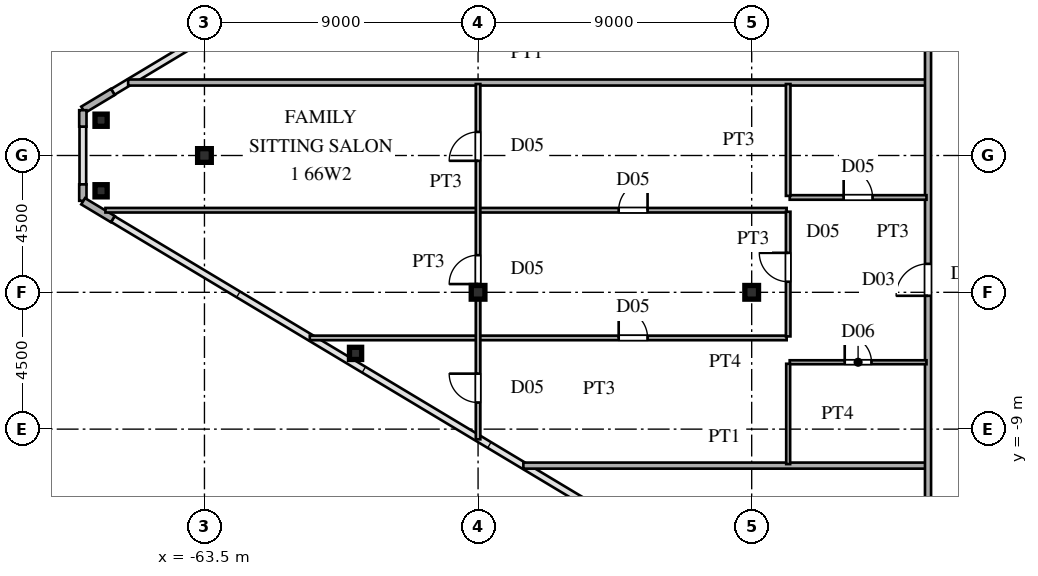
"""IFC4 building model, lengths in metres.
Left out: names, types, materials, properties, quantities, classifications, styles, units other than length and angle.
Written with IfcOpenShell. Run it as: python <this file> out.ifc"""

import sys

from ifc_helpers import new_model, si_unit, direction, frame, frame_2d, origin, origin_2d, place, context, subcontext, project, spatial, rectangle, hollow_rectangle, i_section, extrude, source, transform, mapped, element, fill, save


model = new_model("IFC4")
c1 = context("Model", 3, precision=1e-05, world=origin(), true_north=direction((0.0, 1.0)))
c2 = subcontext(c1, "Body", "Model", "MODEL_VIEW")
j1 = project(units=[si_unit("LENGTHUNIT", "METRE"), si_unit("PLANEANGLEUNIT", "RADIAN")], contexts=[c1])
p1 = place(None, origin())
s1 = spatial("IfcSite", under=j1, at=p1, CompositionType="ELEMENT")
p2 = place(p1, origin())
s2 = spatial("IfcBuilding", under=s1, at=p2, CompositionType="ELEMENT")
p3 = place(p2, frame((0.0, 0.0, 250.65)))
s3 = spatial("IfcBuildingStorey", under=s2, at=p3, CompositionType="ELEMENT", Elevation=250.65)
m1 = source(origin(), c2, "Body", "SweptSolid", [
    extrude(i_section(OverallWidth=0.45, OverallDepth=0.45, WebThickness=0.016, FlangeThickness=0.025, at=origin_2d()), origin(), (0.0, 0.0, 1.0), 3.75),
])
for number, where, z_axis, x_axis in (
    (1, (-45.5, -4.5, 0.0), (0.0, 0.0, 1.0), (1.0, 0.0, 0.0)),
    (2, (-54.5, -4.5, 0.0), (0.0, 0.0, 1.0), (1.0, 0.0, 0.0)),
    (3, (-63.5, 0.0, 0.0), (0.0, 0.0, 1.0), (1.0, 0.0, 0.0)),
):
    element("IfcColumn", number, at=place(p3, frame(where, z_axis=z_axis, x_axis=x_axis)), inside=s3, PredefinedType="COLUMN", context=c2, shape_type="MappedRepresentation", body=[
        mapped(m1, transform((0.0, 0.0, 0.0), scale=1.0)),
    ])
m2 = source(origin(), c2, "Body", "SweptSolid", [
    extrude(hollow_rectangle(XDim=0.4, YDim=0.4, WallThickness=0.016, at=origin_2d()), origin(), (0.0, 0.0, 1.0), 3.75),
])
for number, where, z_axis, x_axis in (
    (4, (-66.9, 1.16, 0.0), (0.0, 0.0, 1.0), (1.0, 0.0, 0.0)),
    (5, (-66.9, -1.16, 0.0), (0.0, 0.0, 1.0), (1.0, 0.0, 0.0)),
    (6, (-58.53, -6.509, 0.0), (0.0, 0.0, 1.0), (1.0, 0.0, 0.0)),
):
    element("IfcColumn", number, at=place(p3, frame(where, z_axis=z_axis, x_axis=x_axis)), inside=s3, PredefinedType="COLUMN", context=c2, shape_type="MappedRepresentation", body=[
        mapped(m2, transform((0.0, 0.0, 0.0), scale=1.0)),
    ])
p4 = place(p3, frame((-66.514, 2.092, 0.0), z_axis=(0.0, 0.0, 1.0), x_axis=(-0.85743623509, -0.514590228002, 0.0)))
e7 = element("IfcWall", 7, at=p4, inside=s3, PredefinedType="SOLIDWALL", context=c2, shape_type="SweptSolid", body=[
    extrude(rectangle(XDim=1.14, YDim=0.24, at=frame_2d((0.57, 0.0))), origin(), (0.0, 0.0, 1.0), 3.53),
])
for number, where, z_axis, x_axis in (
    (8, (-67.5, 1.49, 0.0), (0.0, 0.0, 1.0), (0.0, -1.0, 0.0)),
    (9, (-67.5, -0.95, 0.0), (0.0, 0.0, 1.0), (0.0, -1.0, 0.0)),
):
    element("IfcWall", number, at=place(p3, frame(where, z_axis=z_axis, x_axis=x_axis)), inside=s3, PredefinedType="SOLIDWALL", context=c2, shape_type="SweptSolid", body=[
        extrude(rectangle(XDim=0.54, YDim=0.24, at=frame_2d((0.27, 0.0))), origin(), (0.0, 0.0, 1.0), 3.53),
    ])
p5 = place(p3, frame((-67.491, -1.505, 0.0), z_axis=(0.0, 0.0, 1.0), x_axis=(0.85743623509, -0.514590228002, 0.0)))
e10 = element("IfcWall", 10, at=p5, inside=s3, PredefinedType="SOLIDWALL", context=c2, shape_type="SweptSolid", body=[
    extrude(rectangle(XDim=1.14, YDim=0.24, at=frame_2d((0.57, 0.0))), origin(), (0.0, 0.0, 1.0), 3.53),
])
p6 = place(p3, frame((-53.01, -10.2, 0.0), z_axis=(0.0, 0.0, 1.0), x_axis=(1.0, 0.0, 0.0)))
e11 = element("IfcWall", 11, at=p6, inside=s3, PredefinedType="PARTITIONING", context=c2, shape_type="SweptSolid", body=[
    extrude(rectangle(XDim=13.23, YDim=0.2, at=frame_2d((6.615, 0.0))), origin(), (0.0, 0.0, 1.0), 3.53),
])
p7 = place(p3, frame((-44.25, -6.8, 0.0), z_axis=(0.0, 0.0, 1.0), x_axis=(1.0, 0.0, 0.0)))
e12 = element("IfcWall", 12, at=p7, inside=s3, PredefinedType="PARTITIONING", context=c2, shape_type="SweptSolid", body=[
    extrude(rectangle(XDim=4.5, YDim=0.13, at=frame_2d((2.25, 0.0))), origin(), (0.0, 0.0, 1.0), 3.53),
])
p8 = place(p7, frame((1.81, 0.0, 0.0)))
e13 = element("IfcOpeningElement", 13, at=p8, cuts=e12, PredefinedType="OPENING", context=c2, shape_type="SweptSolid", body=[
    extrude(rectangle(XDim=0.88, YDim=2.1, at=frame_2d((0.44, 1.05))), frame((0.0, 0.075, 0.0), z_axis=(0.0, -1.0, 0.0), x_axis=(1.0, 0.0, 0.0)), (0.0, 0.0, 1.0), 0.15),
])
p9 = place(p3, frame((-60.035, -6.0, 0.0), z_axis=(0.0, 0.0, 1.0), x_axis=(1.0, 0.0, 0.0)))
e14 = element("IfcWall", 14, at=p9, inside=s3, PredefinedType="PARTITIONING", context=c2, shape_type="SweptSolid", body=[
    extrude(rectangle(XDim=15.685, YDim=0.15, at=frame_2d((7.842, 0.0))), origin(), (0.0, 0.0, 1.0), 3.53),
])
p10 = place(p9, frame((10.16, 0.0, 0.0)))
e15 = element("IfcOpeningElement", 15, at=p10, cuts=e14, PredefinedType="OPENING", context=c2, shape_type="SweptSolid", body=[
    extrude(rectangle(XDim=0.95, YDim=2.15, at=frame_2d((0.475, 1.075))), frame((0.0, 0.085, 0.0), z_axis=(0.0, -1.0, 0.0), x_axis=(1.0, 0.0, 0.0)), (0.0, 0.0, 1.0), 0.17),
])
p11 = place(p3, frame((-66.757, -1.8, 0.0), z_axis=(0.0, 0.0, 1.0), x_axis=(1.0, 0.0, 0.0)))
e16 = element("IfcWall", 16, at=p11, inside=s3, PredefinedType="PARTITIONING", context=c2, shape_type="SweptSolid", body=[
    extrude(rectangle(XDim=22.407, YDim=0.15, at=frame_2d((11.204, 0.0))), origin(), (0.0, 0.0, 1.0), 3.53),
])
p12 = place(p11, frame((16.882, 0.0, 0.0)))
e17 = element("IfcOpeningElement", 17, at=p12, cuts=e16, PredefinedType="OPENING", context=c2, shape_type="SweptSolid", body=[
    extrude(rectangle(XDim=0.95, YDim=2.15, at=frame_2d((0.475, 1.075))), frame((0.0, 0.085, 0.0), z_axis=(0.0, -1.0, 0.0), x_axis=(1.0, 0.0, 0.0)), (0.0, 0.0, 1.0), 0.17),
])
p13 = place(p3, frame((-44.25, -1.38, 0.0), z_axis=(0.0, 0.0, 1.0), x_axis=(1.0, 0.0, 0.0)))
e18 = element("IfcWall", 18, at=p13, inside=s3, PredefinedType="PARTITIONING", context=c2, shape_type="SweptSolid", body=[
    extrude(rectangle(XDim=4.5, YDim=0.15, at=frame_2d((2.25, 0.0))), origin(), (0.0, 0.0, 1.0), 3.53),
])
p14 = place(p13, frame((1.775, 0.0, 0.0)))
e19 = element("IfcOpeningElement", 19, at=p14, cuts=e18, PredefinedType="OPENING", context=c2, shape_type="SweptSolid", body=[
    extrude(rectangle(XDim=0.95, YDim=2.15, at=frame_2d((0.475, 1.075))), frame((0.0, 0.085, 0.0), z_axis=(0.0, -1.0, 0.0), x_axis=(1.0, 0.0, 0.0)), (0.0, 0.0, 1.0), 0.17),
])
p15 = place(p3, frame((-66.01, 2.4, 0.0), z_axis=(0.0, 0.0, 1.0), x_axis=(1.0, 0.0, 0.0)))
e20 = element("IfcWall", 20, at=p15, inside=s3, PredefinedType="PARTITIONING", context=c2, shape_type="SweptSolid", body=[
    extrude(rectangle(XDim=26.23, YDim=0.2, at=frame_2d((13.115, 0.0))), origin(), (0.0, 0.0, 1.0), 3.53),
])
p16 = place(p3, frame((-54.5, -9.335, 0.0), z_axis=(0.0, 0.0, 1.0), x_axis=(0.0, 1.0, 0.0)))
e21 = element("IfcWall", 21, at=p16, inside=s3, PredefinedType="PARTITIONING", context=c2, shape_type="SweptSolid", body=[
    extrude(rectangle(XDim=11.685, YDim=0.15, at=frame_2d((5.843, 0.0))), origin(), (0.0, 0.0, 1.0), 2.93),
])
p17 = place(p16, frame((5.107, 0.0, 0.0)))
e22 = element("IfcOpeningElement", 22, at=p17, cuts=e21, PredefinedType="OPENING", context=c2, shape_type="SweptSolid", body=[
    extrude(rectangle(XDim=0.95, YDim=2.15, at=frame_2d((0.475, 1.075))), frame((0.0, 0.085, 0.0), z_axis=(0.0, -1.0, 0.0), x_axis=(1.0, 0.0, 0.0)), (0.0, 0.0, 1.0), 0.17),
])
p18 = place(p16, frame((1.21, 0.0, 0.0)))
e23 = element("IfcOpeningElement", 23, at=p18, cuts=e21, PredefinedType="OPENING", context=c2, shape_type="SweptSolid", body=[
    extrude(rectangle(XDim=0.95, YDim=2.15, at=frame_2d((0.475, 1.075))), frame((0.0, 0.085, 0.0), z_axis=(0.0, -1.0, 0.0), x_axis=(1.0, 0.0, 0.0)), (0.0, 0.0, 1.0), 0.17),
])
p19 = place(p16, frame((9.16, 0.0, 0.0)))
e24 = element("IfcOpeningElement", 24, at=p19, cuts=e21, PredefinedType="OPENING", context=c2, shape_type="SweptSolid", body=[
    extrude(rectangle(XDim=0.95, YDim=2.15, at=frame_2d((0.475, 1.075))), frame((0.0, 0.085, 0.0), z_axis=(0.0, -1.0, 0.0), x_axis=(1.0, 0.0, 0.0)), (0.0, 0.0, 1.0), 0.17),
])
p20 = place(p3, frame((-44.3, -10.15, 0.0), z_axis=(0.0, 0.0, 1.0), x_axis=(0.0, 1.0, 0.0)))
e25 = element("IfcWall", 25, at=p20, inside=s3, PredefinedType="PARTITIONING", context=c2, shape_type="SweptSolid", body=[
    extrude(rectangle(XDim=3.3, YDim=0.13, at=frame_2d((1.65, 0.0))), origin(), (0.0, 0.0, 1.0), 3.53),
])
p21 = place(p3, frame((-44.3, -5.95, 0.0), z_axis=(0.0, 0.0, 1.0), x_axis=(0.0, 1.0, 0.0)))
e26 = element("IfcWall", 26, at=p21, inside=s3, PredefinedType="PARTITIONING", context=c2, shape_type="SweptSolid", body=[
    extrude(rectangle(XDim=4.1, YDim=0.15, at=frame_2d((2.05, 0.0))), origin(), (0.0, 0.0, 1.0), 3.53),
])
p22 = place(p21, frame((1.798, 0.0, 0.0)))
e27 = element("IfcOpeningElement", 27, at=p22, cuts=e26, PredefinedType="OPENING", context=c2, shape_type="SweptSolid", body=[
    extrude(rectangle(XDim=0.95, YDim=2.15, at=frame_2d((0.475, 1.075))), frame((0.0, 0.085, 0.0), z_axis=(0.0, -1.0, 0.0), x_axis=(1.0, 0.0, 0.0)), (0.0, 0.0, 1.0), 0.17),
])
p23 = place(p3, frame((-44.3, -1.328, 0.0), z_axis=(0.0, 0.0, 1.0), x_axis=(0.0, 1.0, 0.0)))
e28 = element("IfcWall", 28, at=p23, inside=s3, PredefinedType="PARTITIONING", context=c2, shape_type="SweptSolid", body=[
    extrude(rectangle(XDim=3.678, YDim=0.15, at=frame_2d((1.839, 0.0))), origin(), (0.0, 0.0, 1.0), 3.53),
])
p24 = place(p3, frame((-39.7, -15.515, 0.0), z_axis=(0.0, 0.0, 1.0), x_axis=(0.0, 1.0, 0.0)))
e29 = element("IfcWall", 29, at=p24, inside=s3, PredefinedType="PARTITIONING", context=c2, shape_type="SweptSolid", body=[
    extrude(rectangle(XDim=31.03, YDim=0.2, at=frame_2d((15.515, 0.0))), origin(), (0.0, 0.0, 1.0), 3.53),
])
p25 = place(p24, frame((2.09, 0.0, 0.0)))
e30 = element("IfcOpeningElement", 30, at=p25, cuts=e29, PredefinedType="OPENING", context=c2, shape_type="SweptSolid", body=[
    extrude(rectangle(XDim=1.05, YDim=2.25, at=frame_2d((0.525, 1.125))), frame((0.0, 0.11, 0.0), z_axis=(0.0, -1.0, 0.0), x_axis=(1.0, 0.0, 0.0)), (0.0, 0.0, 1.0), 0.22),
])
p26 = place(p24, frame((10.901, 0.0, 0.0)))
e31 = element("IfcOpeningElement", 31, at=p26, cuts=e29, PredefinedType="OPENING", context=c2, shape_type="SweptSolid", body=[
    extrude(rectangle(XDim=1.05, YDim=2.25, at=frame_2d((0.525, 1.125))), frame((0.0, 0.11, 0.0), z_axis=(0.0, -1.0, 0.0), x_axis=(1.0, 0.0, 0.0)), (0.0, 0.0, 1.0), 0.22),
])
p27 = place(p24, frame((23.99, 0.0, 0.0)))
e32 = element("IfcOpeningElement", 32, at=p27, cuts=e29, PredefinedType="OPENING", context=c2, shape_type="SweptSolid", body=[
    extrude(rectangle(XDim=1.05, YDim=2.25, at=frame_2d((0.525, 1.125))), frame((0.0, 0.11, 0.0), z_axis=(0.0, -1.0, 0.0), x_axis=(1.0, 0.0, 0.0)), (0.0, 0.0, 1.0), 0.22),
])
m3 = source(origin(), c2, "Body", "SweptSolid", [
    extrude(rectangle(XDim=0.88, YDim=2.1, at=frame_2d((0.44, 1.05))), frame((0.0, 0.025, 0.0), z_axis=(0.0, -1.0, 0.0), x_axis=(1.0, 0.0, 0.0)), (0.0, 0.0, 1.0), 0.05),
])
p28 = place(p8, origin())
e33 = element("IfcDoor", 33, at=p28, inside=s3, OperationType="SINGLE_SWING_LEFT", PredefinedType="DOOR", context=c2, shape_type="MappedRepresentation", body=[
    mapped(m3, transform((0.0, 0.0, 0.0), scale=1.0)),
])
fill(e13, e33)
m4 = source(origin(), c2, "Body", "SweptSolid", [
    extrude(rectangle(XDim=0.95, YDim=2.15, at=frame_2d((0.475, 1.075))), frame((0.0, 0.025, 0.0), z_axis=(0.0, -1.0, 0.0), x_axis=(1.0, 0.0, 0.0)), (0.0, 0.0, 1.0), 0.05),
])
p29 = place(p10, origin())
e34 = element("IfcDoor", 34, at=p29, inside=s3, OperationType="SINGLE_SWING_LEFT", PredefinedType="DOOR", context=c2, shape_type="MappedRepresentation", body=[
    mapped(m4, transform((0.0, 0.0, 0.0), scale=1.0)),
])
fill(e15, e34)
p30 = place(p12, origin())
e35 = element("IfcDoor", 35, at=p30, inside=s3, OperationType="SINGLE_SWING_RIGHT", PredefinedType="DOOR", context=c2, shape_type="MappedRepresentation", body=[
    mapped(m4, transform((0.0, 0.0, 0.0), scale=1.0)),
])
fill(e17, e35)
p31 = place(p14, origin())
e36 = element("IfcDoor", 36, at=p31, inside=s3, OperationType="SINGLE_SWING_LEFT", PredefinedType="DOOR", context=c2, shape_type="MappedRepresentation", body=[
    mapped(m4, transform((0.0, 0.0, 0.0), scale=1.0)),
])
fill(e19, e36)
p32 = place(p17, origin())
e37 = element("IfcDoor", 37, at=p32, inside=s3, OperationType="SINGLE_SWING_LEFT", PredefinedType="DOOR", context=c2, shape_type="MappedRepresentation", body=[
    mapped(m4, transform((0.0, 0.0, 0.0), scale=1.0)),
])
fill(e22, e37)
p33 = place(p18, origin())
e38 = element("IfcDoor", 38, at=p33, inside=s3, OperationType="SINGLE_SWING_RIGHT", PredefinedType="DOOR", context=c2, shape_type="MappedRepresentation", body=[
    mapped(m4, transform((0.0, 0.0, 0.0), scale=1.0)),
])
fill(e23, e38)
p34 = place(p19, origin())
e39 = element("IfcDoor", 39, at=p34, inside=s3, OperationType="SINGLE_SWING_LEFT", PredefinedType="DOOR", context=c2, shape_type="MappedRepresentation", body=[
    mapped(m4, transform((0.0, 0.0, 0.0), scale=1.0)),
])
fill(e24, e39)
p35 = place(p22, origin())
e40 = element("IfcDoor", 40, at=p35, inside=s3, OperationType="SINGLE_SWING_RIGHT", PredefinedType="DOOR", context=c2, shape_type="MappedRepresentation", body=[
    mapped(m4, transform((0.0, 0.0, 0.0), scale=1.0)),
])
fill(e27, e40)
m5 = source(origin(), c2, "Body", "SweptSolid", [
    extrude(rectangle(XDim=1.05, YDim=2.25, at=frame_2d((0.525, 1.125))), frame((0.0, 0.025, 0.0), z_axis=(0.0, -1.0, 0.0), x_axis=(1.0, 0.0, 0.0)), (0.0, 0.0, 1.0), 0.05),
])
p36 = place(p26, origin())
e41 = element("IfcDoor", 41, at=p36, inside=s3, OperationType="SINGLE_SWING_LEFT", PredefinedType="DOOR", context=c2, shape_type="MappedRepresentation", body=[
    mapped(m5, transform((0.0, 0.0, 0.0), scale=1.0)),
])
fill(e31, e41)
save(model, sys.argv[1])
